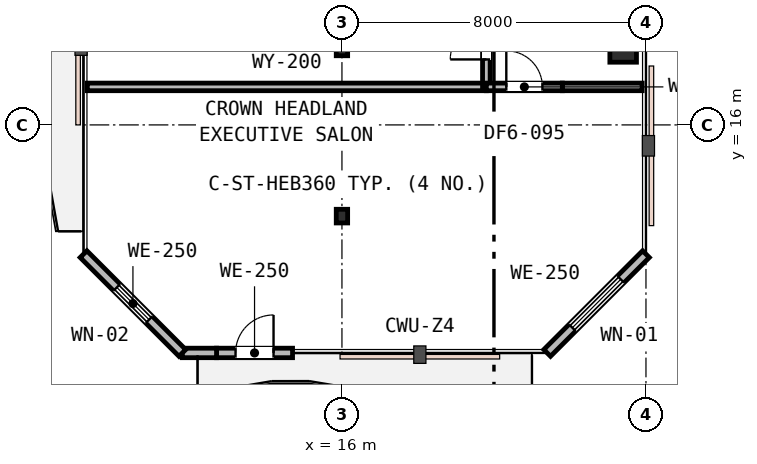
"""IFC4 building model, lengths in metres.
Left out: names, types, materials, properties, quantities, classifications, styles, units other than length and angle.
Written with IfcOpenShell. Run it as: python <this file> out.ifc"""

import sys

from ifc_helpers import new_model, si_unit, direction, frame, frame_2d, origin, origin_2d, place, context, subcontext, project, spatial, rectangle, i_section, extrude, element, fill, save


model = new_model("IFC4")
c1 = context("Model", 3, precision=1e-05, world=origin(), true_north=direction((0.0, 1.0)))
c2 = subcontext(c1, "Body", "Model", "MODEL_VIEW")
j1 = project(units=[si_unit("LENGTHUNIT", "METRE"), si_unit("PLANEANGLEUNIT", "RADIAN")], contexts=[c1])
p1 = place(None, origin())
s1 = spatial("IfcSite", under=j1, at=p1, CompositionType="ELEMENT")
p2 = place(p1, origin())
s2 = spatial("IfcBuilding", under=s1, at=p2, CompositionType="ELEMENT")
p3 = place(p2, frame((0.0, 0.0, 286.8)))
s3 = spatial("IfcBuildingStorey", under=s2, at=p3, CompositionType="ELEMENT", Elevation=286.8)
p4 = place(p3, frame((23.4, 18.0, 0.0), z_axis=(0.0, 0.0, 1.0), x_axis=(1.0, 0.0, 0.0)))
e1 = element("IfcColumn", 1, at=p4, inside=s3, PredefinedType="COLUMN", context=c2, shape_type="SweptSolid", body=[
    extrude(rectangle(XDim=0.7, YDim=0.7, at=origin_2d()), origin(), (0.0, 0.0, 1.0), 3.8),
])
for number, where, z_axis, x_axis in (
    (2, (16.0, 13.6, 0.0), (0.0, 0.0, 1.0), (1.0, 0.0, 0.0)),
    (3, (16.0, 18.0, 0.0), (0.0, 0.0, 1.0), (1.0, 0.0, 0.0)),
):
    element("IfcColumn", number, at=place(p3, frame(where, z_axis=z_axis, x_axis=x_axis)), inside=s3, PredefinedType="COLUMN", context=c2, shape_type="SweptSolid", body=[
        extrude(i_section(OverallWidth=0.3, OverallDepth=0.36, WebThickness=0.013, FlangeThickness=0.022, FilletRadius=0.027, at=origin_2d()), origin(), (0.0, 0.0, 1.0), 3.8),
    ])
p5 = place(p3, frame((12.7, 10.0, 0.0), z_axis=(0.0, 0.0, 1.0), x_axis=(1.0, 0.0, 0.0)))
e4 = element("IfcWall", 4, at=p5, inside=s3, PredefinedType="STANDARD", context=c2, shape_type="SweptSolid", body=[
    extrude(rectangle(XDim=2.0, YDim=0.25, at=frame_2d((1.0, 0.0))), origin(), (0.0, 0.0, 1.0), 3.47),
])
p6 = place(p5, frame((0.5, 0.0, 0.0)))
e5 = element("IfcOpeningElement", 5, at=p6, cuts=e4, PredefinedType="OPENING", context=c2, shape_type="SweptSolid", body=[
    extrude(rectangle(XDim=1.0, YDim=2.15, at=frame_2d((0.5, 1.075))), frame((0.0, 0.135, 0.0), z_axis=(0.0, -1.0, 0.0), x_axis=(1.0, 0.0, 0.0)), (0.0, 0.0, 1.0), 0.27),
])
p7 = place(p3, frame((11.8, 10.0, 0.0), z_axis=(0.0, 0.0, 1.0), x_axis=(1.0, 0.0, 0.0)))
e6 = element("IfcWall", 6, at=p7, inside=s3, PredefinedType="STANDARD", context=c2, shape_type="SweptSolid", body=[
    extrude(rectangle(XDim=0.9, YDim=0.25, at=frame_2d((0.45, 0.0))), origin(), (0.0, 0.0, 1.0), 3.47),
])
p8 = place(p3, frame((21.4, 10.0, 0.0), z_axis=(0.0, 0.0, 1.0), x_axis=(0.707106781187, 0.707106781187, 0.0)))
e7 = element("IfcWall", 7, at=p8, inside=s3, PredefinedType="STANDARD", context=c2, shape_type="SweptSolid", body=[
    extrude(rectangle(XDim=3.677, YDim=0.25, at=frame_2d((1.839, 0.0))), origin(), (0.0, 0.0, 1.0), 3.47),
])
p9 = place(p8, frame((0.939, 0.0, 0.75)))
e8 = element("IfcOpeningElement", 8, at=p9, cuts=e7, PredefinedType="OPENING", context=c2, shape_type="SweptSolid", body=[
    extrude(rectangle(XDim=1.8, YDim=1.85, at=frame_2d((0.9, 0.925))), frame((0.0, 0.135, 0.0), z_axis=(0.0, -1.0, 0.0), x_axis=(1.0, 0.0, 0.0)), (0.0, 0.0, 1.0), 0.27),
])
p10 = place(p3, frame((9.2, 12.6, 0.0), z_axis=(0.0, 0.0, 1.0), x_axis=(0.707106781187, -0.707106781187, 0.0)))
e9 = element("IfcWall", 9, at=p10, inside=s3, PredefinedType="STANDARD", context=c2, shape_type="SweptSolid", body=[
    extrude(rectangle(XDim=3.677, YDim=0.25, at=frame_2d((1.839, 0.0))), origin(), (0.0, 0.0, 1.0), 3.47),
])
p11 = place(p10, frame((1.238, 0.0, 0.85)))
e10 = element("IfcOpeningElement", 10, at=p11, cuts=e9, PredefinedType="OPENING", context=c2, shape_type="SweptSolid", body=[
    extrude(rectangle(XDim=1.2, YDim=1.6, at=frame_2d((0.6, 0.8))), frame((0.0, 0.135, 0.0), z_axis=(0.0, -1.0, 0.0), x_axis=(1.0, 0.0, 0.0)), (0.0, 0.0, 1.0), 0.27),
])
p12 = place(p3, frame((9.3, 17.0, 0.0), z_axis=(0.0, 0.0, 1.0), x_axis=(1.0, 0.0, 0.0)))
e11 = element("IfcWall", 11, at=p12, inside=s3, PredefinedType="PARTITIONING", context=c2, shape_type="SweptSolid", body=[
    extrude(rectangle(XDim=10.5, YDim=0.2, at=frame_2d((5.25, 0.0))), origin(), (0.0, 0.0, 1.0), 3.47),
])
p13 = place(p3, frame((21.8, 17.0, 0.0), z_axis=(0.0, 0.0, 1.0), x_axis=(1.0, 0.0, 0.0)))
e12 = element("IfcWall", 12, at=p13, inside=s3, PredefinedType="PARTITIONING", context=c2, shape_type="SweptSolid", body=[
    extrude(rectangle(XDim=2.1, YDim=0.2, at=frame_2d((1.05, 0.0))), origin(), (0.0, 0.0, 1.0), 3.47),
])
p14 = place(p3, frame((19.8, 17.0, 0.0), z_axis=(0.0, 0.0, 1.0), x_axis=(0.0, 1.0, 0.0)))
e13 = element("IfcWall", 13, at=p14, inside=s3, PredefinedType="PARTITIONING", context=c2, shape_type="SweptSolid", body=[
    extrude(rectangle(XDim=11.6, YDim=0.2, at=frame_2d((5.8, 0.0))), origin(), (0.0, 0.0, 1.0), 3.18),
])
p15 = place(p14, frame((0.723, 0.0, 0.0)))
e14 = element("IfcOpeningElement", 14, at=p15, cuts=e13, PredefinedType="OPENING", context=c2, shape_type="SweptSolid", body=[
    extrude(rectangle(XDim=0.95, YDim=2.15, at=frame_2d((0.475, 1.075))), frame((0.0, 0.11, 0.0), z_axis=(0.0, -1.0, 0.0), x_axis=(1.0, 0.0, 0.0)), (0.0, 0.0, 1.0), 0.22),
])
p16 = place(p3, frame((19.8, 17.0, 0.0), z_axis=(0.0, 0.0, 1.0), x_axis=(1.0, 0.0, 0.0)))
e15 = element("IfcWall", 15, at=p16, inside=s3, PredefinedType="PARTITIONING", context=c2, shape_type="SweptSolid", body=[
    extrude(rectangle(XDim=2.0, YDim=0.2, at=frame_2d((1.0, 0.0))), origin(), (0.0, 0.0, 1.0), 3.47),
])
p17 = place(p16, frame((0.525, 0.0, 0.0)))
e16 = element("IfcOpeningElement", 16, at=p17, cuts=e15, PredefinedType="OPENING", context=c2, shape_type="SweptSolid", body=[
    extrude(rectangle(XDim=0.95, YDim=2.15, at=frame_2d((0.475, 1.075))), frame((0.0, 0.11, 0.0), z_axis=(0.0, -1.0, 0.0), x_axis=(1.0, 0.0, 0.0)), (0.0, 0.0, 1.0), 0.22),
])
p18 = place(p6, origin())
e17 = element("IfcDoor", 17, at=p18, inside=s3, OperationType="SINGLE_SWING_RIGHT", PredefinedType="DOOR", context=c2, shape_type="SweptSolid", body=[
    extrude(rectangle(XDim=1.0, YDim=2.15, at=frame_2d((0.5, 1.075))), frame((0.0, 0.025, 0.0), z_axis=(0.0, -1.0, 0.0), x_axis=(1.0, 0.0, 0.0)), (0.0, 0.0, 1.0), 0.05),
])
fill(e5, e17)
p19 = place(p9, origin())
e18 = element("IfcWindow", 18, at=p19, inside=s3, PartitioningType="SINGLE_PANEL", PredefinedType="WINDOW", context=c2, shape_type="SweptSolid", body=[
    extrude(rectangle(XDim=1.8, YDim=1.85, at=frame_2d((0.9, 0.925))), frame((0.0, 0.03, 0.0), z_axis=(0.0, -1.0, 0.0), x_axis=(1.0, 0.0, 0.0)), (0.0, 0.0, 1.0), 0.06),
])
fill(e8, e18)
p20 = place(p11, origin())
e19 = element("IfcWindow", 19, at=p20, inside=s3, PartitioningType="SINGLE_PANEL", PredefinedType="WINDOW", context=c2, shape_type="SweptSolid", body=[
    extrude(rectangle(XDim=1.2, YDim=1.6, at=frame_2d((0.6, 0.8))), frame((0.0, 0.03, 0.0), z_axis=(0.0, -1.0, 0.0), x_axis=(1.0, 0.0, 0.0)), (0.0, 0.0, 1.0), 0.06),
])
fill(e10, e19)
p21 = place(p15, origin())
e20 = element("IfcDoor", 20, at=p21, inside=s3, OperationType="SINGLE_SWING_LEFT", PredefinedType="DOOR", context=c2, shape_type="SweptSolid", body=[
    extrude(rectangle(XDim=0.95, YDim=2.15, at=frame_2d((0.475, 1.075))), frame((0.0, 0.025, 0.0), z_axis=(0.0, -1.0, 0.0), x_axis=(1.0, 0.0, 0.0)), (0.0, 0.0, 1.0), 0.05),
])
fill(e14, e20)
p22 = place(p17, origin())
e21 = element("IfcDoor", 21, at=p22, inside=s3, OperationType="SINGLE_SWING_LEFT", PredefinedType="DOOR", context=c2, shape_type="SweptSolid", body=[
    extrude(rectangle(XDim=0.95, YDim=2.15, at=frame_2d((0.475, 1.075))), frame((0.0, 0.025, 0.0), z_axis=(0.0, -1.0, 0.0), x_axis=(1.0, 0.0, 0.0)), (0.0, 0.0, 1.0), 0.05),
])
fill(e16, e21)
save(model, sys.argv[1])
